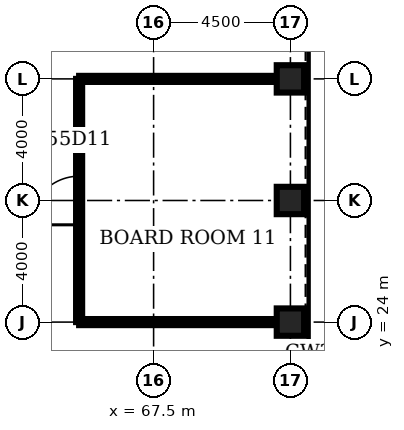
"""IFC4 building model, lengths in metres.
Left out: names, types, materials, properties, quantities, classifications, styles, units other than length and angle.
Written with IfcOpenShell. Run it as: python <this file> out.ifc"""

import sys

from ifc_helpers import new_model, si_unit, direction, frame, frame_2d, origin, origin_2d, place, context, subcontext, project, spatial, rectangle, hollow_rectangle, extrude, element, fill, save


model = new_model("IFC4")
c1 = context("Model", 3, precision=1e-05, world=origin(), true_north=direction((0.0, 1.0)))
c2 = subcontext(c1, "Body", "Model", "MODEL_VIEW")
j1 = project(units=[si_unit("LENGTHUNIT", "METRE"), si_unit("PLANEANGLEUNIT", "RADIAN")], contexts=[c1])
p1 = place(None, origin())
s1 = spatial("IfcSite", under=j1, at=p1, CompositionType="ELEMENT")
p2 = place(p1, origin())
s2 = spatial("IfcBuilding", under=s1, at=p2, CompositionType="ELEMENT")
p3 = place(p2, frame((0.0, 0.0, 244.6)))
s3 = spatial("IfcBuildingStorey", under=s2, at=p3, CompositionType="ELEMENT", Elevation=244.6)
for number, where, z_axis, x_axis in (
    (1, (72.0, 24.0, 0.0), (0.0, 0.0, 1.0), (1.0, 0.0, 0.0)),
    (2, (72.0, 28.0, 0.0), (0.0, 0.0, 1.0), (1.0, 0.0, 0.0)),
    (3, (72.0, 32.0, 0.0), (0.0, 0.0, 1.0), (1.0, 0.0, 0.0)),
):
    element("IfcColumn", number, at=place(p3, frame(where, z_axis=z_axis, x_axis=x_axis)), inside=s3, PredefinedType="COLUMN", context=c2, shape_type="SweptSolid", body=[
        extrude(hollow_rectangle(XDim=0.9, YDim=0.9, WallThickness=0.08, at=origin_2d()), origin(), (0.0, 0.0, 1.0), 4.2),
    ])
for number, where, z_axis, x_axis in (
    (4, (65.05, 24.0, 0.0), (0.0, 0.0, 1.0), (1.0, 0.0, 0.0)),
    (5, (65.05, 32.0, 0.0), (0.0, 0.0, 1.0), (1.0, 0.0, 0.0)),
):
    element("IfcWall", number, at=place(p3, frame(where, z_axis=z_axis, x_axis=x_axis)), inside=s3, PredefinedType="PARTITIONING", context=c2, shape_type="SweptSolid", body=[
        extrude(rectangle(XDim=6.5, YDim=0.2, at=frame_2d((3.25, 0.0))), origin(), (0.0, 0.0, 1.0), 3.0),
    ])
p4 = place(p3, frame((65.05, 24.0, 0.0), z_axis=(0.0, 0.0, 1.0), x_axis=(0.0, 1.0, 0.0)))
e6 = element("IfcWall", 6, at=p4, inside=s3, PredefinedType="PARTITIONING", context=c2, shape_type="SweptSolid", body=[
    extrude(rectangle(XDim=8.0, YDim=0.2, at=frame_2d((4.0, 0.0))), origin(), (0.0, 0.0, 1.0), 3.0),
])
p5 = place(p4, frame((3.2, 0.0, 0.0)))
e7 = element("IfcOpeningElement", 7, at=p5, cuts=e6, PredefinedType="OPENING", context=c2, shape_type="SweptSolid", body=[
    extrude(rectangle(XDim=1.6, YDim=2.1, at=frame_2d((0.8, 1.05))), frame((0.0, 0.11, 0.0), z_axis=(0.0, -1.0, 0.0), x_axis=(1.0, 0.0, 0.0)), (0.0, 0.0, 1.0), 0.22),
])
p6 = place(p5, origin())
e8 = element("IfcDoor", 8, at=p6, inside=s3, OperationType="SINGLE_SWING_LEFT", PredefinedType="DOOR", context=c2, shape_type="SweptSolid", body=[
    extrude(rectangle(XDim=1.6, YDim=2.1, at=frame_2d((0.8, 1.05))), frame((0.0, 0.025, 0.0), z_axis=(0.0, -1.0, 0.0), x_axis=(1.0, 0.0, 0.0)), (0.0, 0.0, 1.0), 0.05),
])
fill(e7, e8)
save(model, sys.argv[1])
